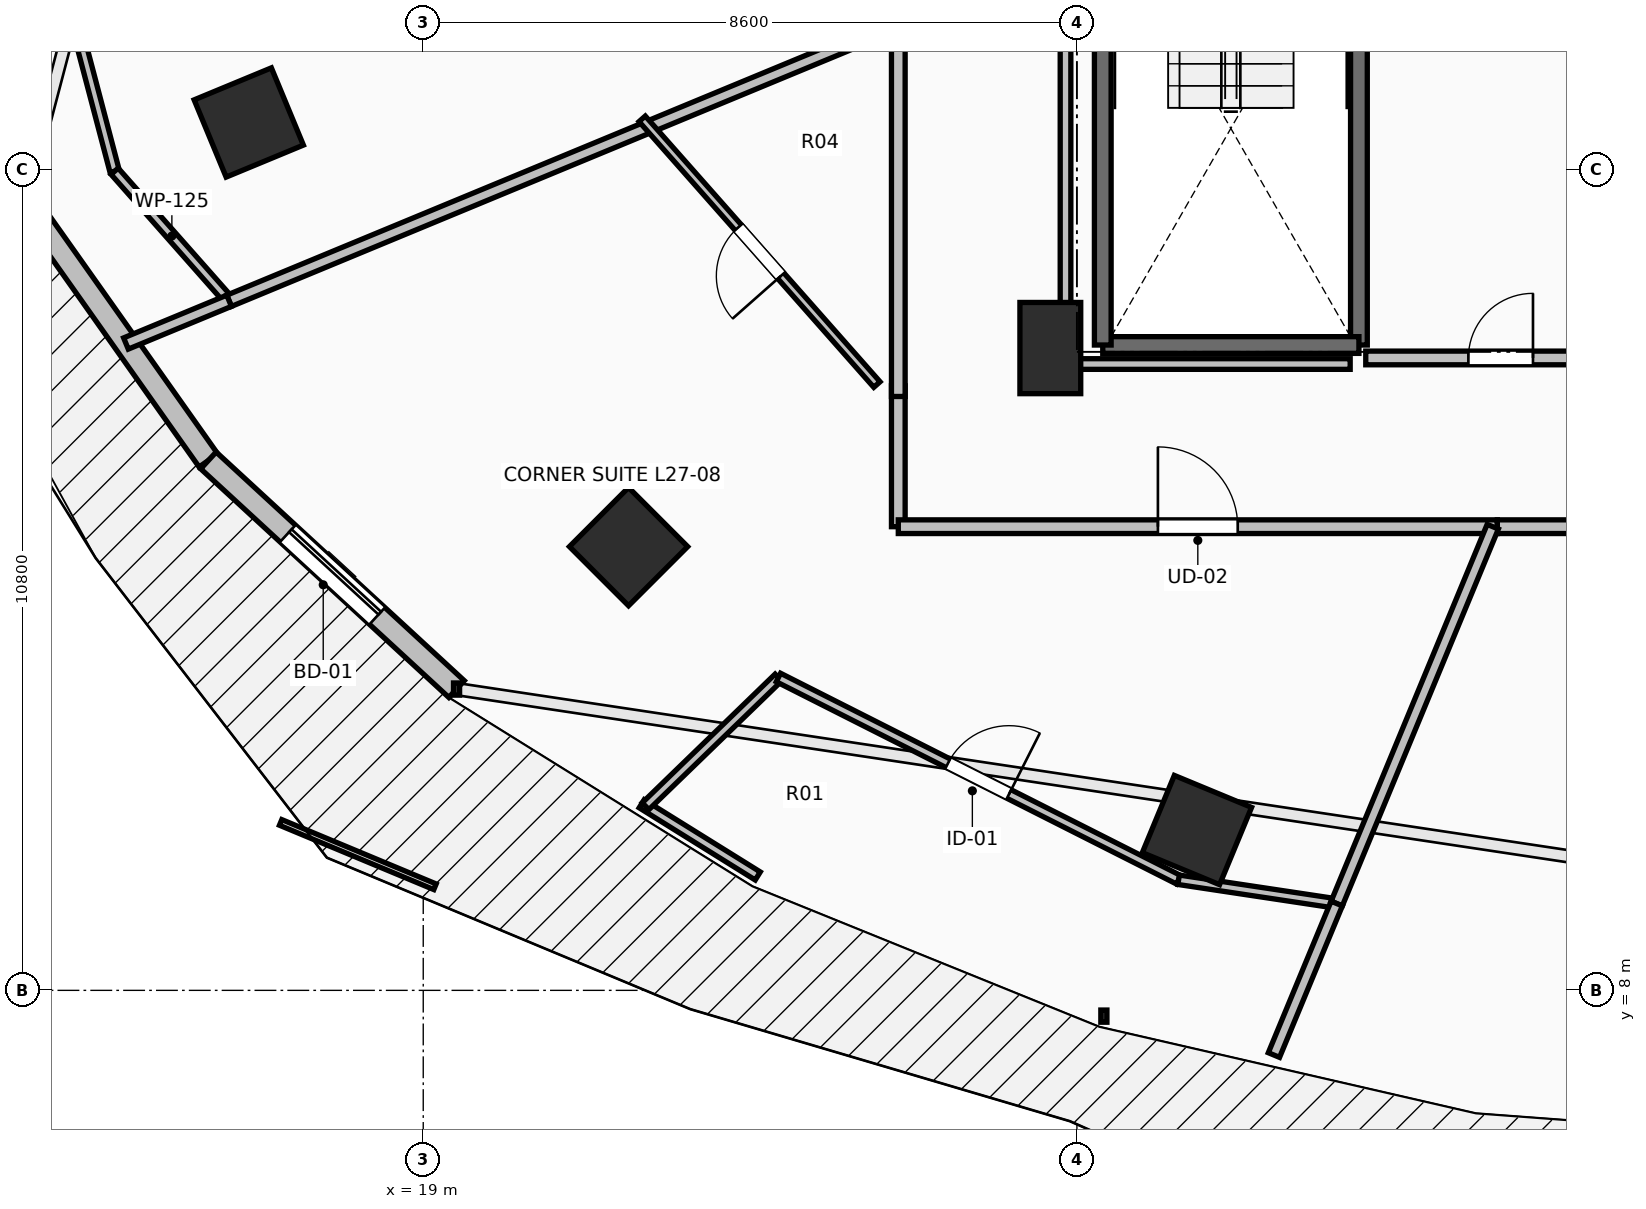
"""IFC4 building model, lengths in metres.
Left out: names, types, materials, properties, quantities, classifications, styles, units other than length and angle.
Written with IfcOpenShell. Run it as: python <this file> out.ifc"""

import sys

from ifc_helpers import new_model, si_unit, direction, frame, frame_2d, origin, origin_2d, place, context, subcontext, project, spatial, rectangle, extrude, element, fill, save


model = new_model("IFC4")
c1 = context("Model", 3, precision=1e-05, world=origin(), true_north=direction((0.0, 1.0)))
c2 = subcontext(c1, "Body", "Model", "MODEL_VIEW")
j1 = project(units=[si_unit("LENGTHUNIT", "METRE"), si_unit("PLANEANGLEUNIT", "RADIAN")], contexts=[c1])
p1 = place(None, origin())
s1 = spatial("IfcSite", under=j1, at=p1, CompositionType="ELEMENT")
p2 = place(p1, origin())
s2 = spatial("IfcBuilding", under=s1, at=p2, CompositionType="ELEMENT")
p3 = place(p2, frame((0.0, 0.0, 103.3)))
s3 = spatial("IfcBuildingStorey", under=s2, at=p3, CompositionType="ELEMENT", Elevation=103.3)
for number, where, z_axis, x_axis in (
    (1, (16.705, 19.418, 0.0), (0.0, 0.0, 1.0), (-0.924, -0.383, 0.0)),
    (2, (21.701, 13.838, 0.0), (0.0, 0.0, 1.0), (-0.707, -0.707, 0.0)),
    (3, (29.179, 10.109, 0.0), (0.0, 0.0, 1.0), (-0.383, -0.924, 0.0)),
):
    element("IfcColumn", number, at=place(p3, frame(where, z_axis=z_axis, x_axis=x_axis)), inside=s3, PredefinedType="COLUMN", context=c2, shape_type="SweptSolid", body=[
        extrude(rectangle(XDim=1.1, YDim=1.1, at=origin_2d()), origin(), (0.0, 0.0, 1.0), 3.5),
    ])
p4 = place(p3, frame((27.25, 16.45, 0.0), z_axis=(0.0, 0.0, 1.0), x_axis=(1.0, 0.0, 0.0)))
e4 = element("IfcColumn", 4, at=p4, inside=s3, PredefinedType="PILASTER", context=c2, shape_type="SweptSolid", body=[
    extrude(rectangle(XDim=0.8, YDim=1.2, at=origin_2d()), origin(), (0.0, 0.0, 1.0), 3.5),
])
p5 = place(p3, frame((13.748, 18.404, 0.0), z_axis=(0.0, 0.0, 1.0), x_axis=(0.57716435238, -0.81662801222, 0.0)))
e5 = element("IfcWall", 5, at=p5, inside=s3, PredefinedType="STANDARD", context=c2, shape_type="SweptSolid", body=[
    extrude(rectangle(XDim=4.202, YDim=0.3, at=frame_2d((2.101, 0.0))), origin(), (0.0, 0.0, 1.0), 3.24),
])
p6 = place(p3, frame((16.174, 14.972, 0.0), z_axis=(0.0, 0.0, 1.0), x_axis=(0.735416718093, -0.677615119924, 0.0)))
e6 = element("IfcWall", 6, at=p6, inside=s3, PredefinedType="STANDARD", context=c2, shape_type="SweptSolid", body=[
    extrude(rectangle(XDim=4.439, YDim=0.3, at=frame_2d((2.22, 0.0))), origin(), (0.0, 0.0, 1.0), 3.24),
])
p7 = place(p6, frame((1.419, 0.0, 0.0)))
e7 = element("IfcOpeningElement", 7, at=p7, cuts=e6, PredefinedType="OPENING", context=c2, shape_type="SweptSolid", body=[
    extrude(rectangle(XDim=1.6, YDim=2.3, at=frame_2d((0.8, 1.15))), frame((0.0, 0.165, 0.0), z_axis=(0.0, -1.0, 0.0), x_axis=(1.0, 0.0, 0.0)), (0.0, 0.0, 1.0), 0.33),
])
p8 = place(p3, frame((31.31, 23.91, 0.0), z_axis=(0.0, 0.0, 1.0), x_axis=(0.0, -1.0, 0.0)))
e8 = element("IfcWall", 8, at=p8, inside=s3, PredefinedType="SOLIDWALL", context=c2, shape_type="SweptSolid", body=[
    extrude(rectangle(XDim=7.42, YDim=0.22, at=frame_2d((3.71, 0.0))), origin(), (0.0, 0.0, 1.0), 3.24),
])
p9 = place(p3, frame((31.31, 16.49, 0.0), z_axis=(0.0, 0.0, 1.0), x_axis=(-1.0, 0.0, 0.0)))
e9 = element("IfcWall", 9, at=p9, inside=s3, PredefinedType="SOLIDWALL", context=c2, shape_type="SweptSolid", body=[
    extrude(rectangle(XDim=3.37, YDim=0.22, at=frame_2d((1.685, 0.0))), origin(), (0.0, 0.0, 1.0), 3.24),
])
p10 = place(p3, frame((27.94, 16.49, 0.0), z_axis=(0.0, 0.0, 1.0), x_axis=(0.0, 1.0, 0.0)))
e10 = element("IfcWall", 10, at=p10, inside=s3, PredefinedType="SOLIDWALL", context=c2, shape_type="SweptSolid", body=[
    extrude(rectangle(XDim=7.42, YDim=0.22, at=frame_2d((3.71, 0.0))), origin(), (0.0, 0.0, 1.0), 3.24),
])
p11 = place(p3, frame((31.4, 16.32, 0.0), z_axis=(0.0, 0.0, 1.0), x_axis=(1.0, 0.0, 0.0)))
e11 = element("IfcWall", 11, at=p11, inside=s3, PredefinedType="PARTITIONING", context=c2, shape_type="SweptSolid", body=[
    extrude(rectangle(XDim=3.55, YDim=0.18, at=frame_2d((1.775, 0.0))), origin(), (0.0, 0.0, 1.0), 3.24),
])
p12 = place(p11, frame((1.35, 0.0, 0.0)))
e12 = element("IfcOpeningElement", 12, at=p12, cuts=e11, PredefinedType="OPENING", context=c2, shape_type="SweptSolid", body=[
    extrude(rectangle(XDim=0.85, YDim=2.1, at=frame_2d((0.425, 1.05))), frame((0.0, 0.105, 0.0), z_axis=(0.0, -1.0, 0.0), x_axis=(1.0, 0.0, 0.0)), (0.0, 0.0, 1.0), 0.21),
])
p13 = place(p3, frame((25.25, 15.953, 0.0), z_axis=(0.0, 0.0, 1.0), x_axis=(0.0, -1.0, 0.0)))
e13 = element("IfcWall", 13, at=p13, inside=s3, PredefinedType="PARTITIONING", context=c2, shape_type="SweptSolid", body=[
    extrude(rectangle(XDim=1.853, YDim=0.18, at=frame_2d((0.926, 0.0))), origin(), (0.0, 0.0, 1.0), 2.432),
])
p14 = place(p3, frame((25.25, 14.1, 0.0), z_axis=(0.0, 0.0, 1.0), x_axis=(1.0, 0.0, 0.0)))
e14 = element("IfcWall", 14, at=p14, inside=s3, PredefinedType="PARTITIONING", context=c2, shape_type="SweptSolid", body=[
    extrude(rectangle(XDim=7.881, YDim=0.18, at=frame_2d((3.94, 0.0))), origin(), (0.0, 0.0, 1.0), 2.432),
])
p15 = place(p14, frame((3.416, 0.0, 0.0)))
e15 = element("IfcOpeningElement", 15, at=p15, cuts=e14, PredefinedType="OPENING", context=c2, shape_type="SweptSolid", body=[
    extrude(rectangle(XDim=1.05, YDim=2.2, at=frame_2d((0.525, 1.1))), frame((0.0, 0.105, 0.0), z_axis=(0.0, -1.0, 0.0), x_axis=(1.0, 0.0, 0.0)), (0.0, 0.0, 1.0), 0.21),
])
p16 = place(p3, frame((25.25, 20.794, 0.0), z_axis=(0.0, 0.0, 1.0), x_axis=(0.0, -1.0, 0.0)))
e16 = element("IfcWall", 16, at=p16, inside=s3, PredefinedType="PARTITIONING", context=c2, shape_type="SweptSolid", body=[
    extrude(rectangle(XDim=4.981, YDim=0.18, at=frame_2d((2.49, 0.0))), origin(), (0.0, 0.0, 1.0), 2.432),
])
p17 = place(p3, frame((33.131, 14.1, 0.0), z_axis=(0.0, 0.0, 1.0), x_axis=(1.0, 0.0, 0.0)))
e17 = element("IfcWall", 17, at=p17, inside=s3, PredefinedType="PARTITIONING", context=c2, shape_type="SweptSolid", body=[
    extrude(rectangle(XDim=9.069, YDim=0.18, at=frame_2d((4.534, 0.0))), origin(), (0.0, 0.0, 1.0), 2.886),
])
p18 = place(p17, frame((4.034, 0.0, 0.0)))
e18 = element("IfcOpeningElement", 18, at=p18, cuts=e17, PredefinedType="OPENING", context=c2, shape_type="SweptSolid", body=[
    extrude(rectangle(XDim=1.0, YDim=2.15, at=frame_2d((0.5, 1.075))), frame((0.0, 0.105, 0.0), z_axis=(0.0, -1.0, 0.0), x_axis=(1.0, 0.0, 0.0)), (0.0, 0.0, 1.0), 0.21),
])
p19 = place(p3, frame((13.04, 26.0, 0.0), z_axis=(0.0, 0.0, 1.0), x_axis=(0.254345287821, -0.967113475536, 0.0)))
e19 = element("IfcWall", 19, at=p19, inside=s3, PredefinedType="PARTITIONING", context=c2, shape_type="SweptSolid", body=[
    extrude(rectangle(XDim=7.47, YDim=0.125, at=frame_2d((3.735, 0.0))), origin(), (0.0, 0.0, 1.0), 3.24),
])
p20 = place(p19, frame((3.285, 0.0, 0.0)))
e20 = element("IfcOpeningElement", 20, at=p20, cuts=e19, PredefinedType="OPENING", context=c2, shape_type="SweptSolid", body=[
    extrude(rectangle(XDim=0.9, YDim=2.1, at=frame_2d((0.45, 1.05))), frame((0.0, 0.077, 0.0), z_axis=(0.0, -1.0, 0.0), x_axis=(1.0, 0.0, 0.0)), (0.0, 0.0, 1.0), 0.155),
])
p21 = place(p3, frame((14.94, 18.776, 0.0), z_axis=(0.0, 0.0, 1.0), x_axis=(0.662288913482, -0.749248553605, 0.0)))
e21 = element("IfcWall", 21, at=p21, inside=s3, PredefinedType="PARTITIONING", context=c2, shape_type="SweptSolid", body=[
    extrude(rectangle(XDim=2.274, YDim=0.125, at=frame_2d((1.137, 0.0))), origin(), (0.0, 0.0, 1.0), 3.24),
])
p22 = place(p3, frame((16.446, 17.072, 0.0), z_axis=(0.0, 0.0, 1.0), x_axis=(0.92387006918, 0.382706278068, 0.0)))
e22 = element("IfcWall", 22, at=p22, inside=s3, PredefinedType="PARTITIONING", context=c2, shape_type="SweptSolid", body=[
    extrude(rectangle(XDim=9.53, YDim=0.16, at=frame_2d((4.765, 0.0))), origin(), (0.0, 0.0, 1.0), 2.432),
])
p23 = place(p3, frame((15.089, 16.51, 0.0), z_axis=(0.0, 0.0, 1.0), x_axis=(0.923891226159, 0.382655200183, 0.0)))
e23 = element("IfcWall", 23, at=p23, inside=s3, PredefinedType="PARTITIONING", context=c2, shape_type="SweptSolid", body=[
    extrude(rectangle(XDim=1.469, YDim=0.16, at=frame_2d((0.734, 0.0))), origin(), (0.0, 0.0, 1.0), 3.24),
])
p24 = place(p3, frame((24.969, 15.97, 0.0), z_axis=(0.0, 0.0, 1.0), x_axis=(-0.662106207726, 0.749410014405, 0.0)))
e24 = element("IfcWall", 24, at=p24, inside=s3, PredefinedType="PARTITIONING", context=c2, shape_type="SweptSolid", body=[
    extrude(rectangle(XDim=4.665, YDim=0.11, at=frame_2d((2.332, 0.0))), origin(), (0.0, 0.0, 1.0), 2.432),
])
p25 = place(p24, frame((1.907, 0.0, 0.0)))
e25 = element("IfcOpeningElement", 25, at=p25, cuts=e24, PredefinedType="OPENING", context=c2, shape_type="SweptSolid", body=[
    extrude(rectangle(XDim=0.85, YDim=2.1, at=frame_2d((0.425, 1.05))), frame((0.0, 0.07, 0.0), z_axis=(0.0, -1.0, 0.0), x_axis=(1.0, 0.0, 0.0)), (0.0, 0.0, 1.0), 0.14),
])
p26 = place(p3, frame((21.874, 10.455, 0.0), z_axis=(0.0, 0.0, 1.0), x_axis=(0.849018711668, -0.528362779951, 0.0)))
e26 = element("IfcWall", 26, at=p26, inside=s3, PredefinedType="PARTITIONING", context=c2, shape_type="SweptSolid", body=[
    extrude(rectangle(XDim=1.798, YDim=0.125, at=frame_2d((0.899, 0.0))), origin(), (0.0, 0.0, 1.0), 3.24),
])
p27 = place(p3, frame((21.925, 10.423, 0.0), z_axis=(0.0, 0.0, 1.0), x_axis=(0.718353026202, 0.695678754704, 0.0)))
e27 = element("IfcWall", 27, at=p27, inside=s3, PredefinedType="PARTITIONING", context=c2, shape_type="SweptSolid", body=[
    extrude(rectangle(XDim=2.433, YDim=0.125, at=frame_2d((1.217, 0.0))), origin(), (0.0, 0.0, 1.0), 3.24),
])
p28 = place(p3, frame((23.673, 12.116, 0.0), z_axis=(0.0, 0.0, 1.0), x_axis=(0.892490283816, -0.451066617357, 0.0)))
e28 = element("IfcWall", 28, at=p28, inside=s3, PredefinedType="PARTITIONING", context=c2, shape_type="SweptSolid", body=[
    extrude(rectangle(XDim=5.899, YDim=0.125, at=frame_2d((2.95, 0.0))), origin(), (0.0, 0.0, 1.0), 3.24),
])
p29 = place(p28, frame((2.5, 0.0, 0.0)))
e29 = element("IfcOpeningElement", 29, at=p29, cuts=e28, PredefinedType="OPENING", context=c2, shape_type="SweptSolid", body=[
    extrude(rectangle(XDim=0.9, YDim=2.1, at=frame_2d((0.45, 1.05))), frame((0.0, 0.077, 0.0), z_axis=(0.0, -1.0, 0.0), x_axis=(1.0, 0.0, 0.0)), (0.0, 0.0, 1.0), 0.155),
])
p30 = place(p3, frame((28.938, 9.455, 0.0), z_axis=(0.0, 0.0, 1.0), x_axis=(0.988868142427, -0.148794478708, 0.0)))
e30 = element("IfcWall", 30, at=p30, inside=s3, PredefinedType="PARTITIONING", context=c2, shape_type="SweptSolid", body=[
    extrude(rectangle(XDim=2.104, YDim=0.125, at=frame_2d((1.052, 0.0))), origin(), (0.0, 0.0, 1.0), 3.24),
])
p31 = place(p3, frame((31.018, 9.142, 0.0), z_axis=(0.0, 0.0, 1.0), x_axis=(0.382572793579, 0.923925352836, 0.0)))
e31 = element("IfcWall", 31, at=p31, inside=s3, PredefinedType="PARTITIONING", context=c2, shape_type="SweptSolid", body=[
    extrude(rectangle(XDim=5.366, YDim=0.16, at=frame_2d((2.683, 0.0))), origin(), (0.0, 0.0, 1.0), 2.677),
])
p32 = place(p3, frame((30.192, 7.149, 0.0), z_axis=(0.0, 0.0, 1.0), x_axis=(0.382911401564, 0.923785071622, 0.0)))
e32 = element("IfcWall", 32, at=p32, inside=s3, PredefinedType="PARTITIONING", context=c2, shape_type="SweptSolid", body=[
    extrude(rectangle(XDim=2.158, YDim=0.16, at=frame_2d((1.079, 0.0))), origin(), (0.0, 0.0, 1.0), 3.24),
])
p33 = place(p3, frame((31.195, 16.24, 0.0), z_axis=(0.0, 0.0, 1.0), x_axis=(-1.0, 0.0, 0.0)))
e33 = element("IfcWall", 33, at=p33, inside=s3, PredefinedType="PARTITIONING", context=c2, shape_type="SweptSolid", body=[
    extrude(rectangle(XDim=3.745, YDim=0.14, at=frame_2d((1.873, 0.0))), origin(), (0.0, 0.0, 1.0), 2.432),
])
p34 = place(p3, frame((27.45, 16.24, 0.0), z_axis=(0.0, 0.0, 1.0), x_axis=(0.0, 1.0, 0.0)))
e34 = element("IfcWall", 34, at=p34, inside=s3, PredefinedType="PARTITIONING", context=c2, shape_type="SweptSolid", body=[
    extrude(rectangle(XDim=7.514, YDim=0.14, at=frame_2d((3.757, 0.0))), origin(), (0.0, 0.0, 1.0), 2.432),
])
p35 = place(p7, origin())
e35 = element("IfcDoor", 35, at=p35, inside=s3, OperationType="SLIDING_TO_LEFT", PredefinedType="DOOR", context=c2, shape_type="SweptSolid", body=[
    extrude(rectangle(XDim=1.6, YDim=2.3, at=frame_2d((0.8, 1.15))), frame((0.0, 0.025, 0.0), z_axis=(0.0, -1.0, 0.0), x_axis=(1.0, 0.0, 0.0)), (0.0, 0.0, 1.0), 0.05),
])
fill(e7, e35)
p36 = place(p12, origin())
e36 = element("IfcDoor", 36, at=p36, inside=s3, OperationType="SINGLE_SWING_RIGHT", PredefinedType="DOOR", context=c2, shape_type="SweptSolid", body=[
    extrude(rectangle(XDim=0.85, YDim=2.1, at=frame_2d((0.425, 1.05))), frame((0.0, 0.025, 0.0), z_axis=(0.0, -1.0, 0.0), x_axis=(1.0, 0.0, 0.0)), (0.0, 0.0, 1.0), 0.05),
])
fill(e12, e36)
p37 = place(p15, origin())
e37 = element("IfcDoor", 37, at=p37, inside=s3, OperationType="SINGLE_SWING_LEFT", PredefinedType="DOOR", context=c2, shape_type="SweptSolid", body=[
    extrude(rectangle(XDim=1.05, YDim=2.2, at=frame_2d((0.525, 1.1))), frame((0.0, 0.025, 0.0), z_axis=(0.0, -1.0, 0.0), x_axis=(1.0, 0.0, 0.0)), (0.0, 0.0, 1.0), 0.05),
])
fill(e15, e37)
p38 = place(p25, origin())
e38 = element("IfcDoor", 38, at=p38, inside=s3, OperationType="SINGLE_SWING_LEFT", PredefinedType="DOOR", context=c2, shape_type="SweptSolid", body=[
    extrude(rectangle(XDim=0.85, YDim=2.1, at=frame_2d((0.425, 1.05))), frame((0.0, 0.025, 0.0), z_axis=(0.0, -1.0, 0.0), x_axis=(1.0, 0.0, 0.0)), (0.0, 0.0, 1.0), 0.05),
])
fill(e25, e38)
p39 = place(p29, origin())
e39 = element("IfcDoor", 39, at=p39, inside=s3, OperationType="SINGLE_SWING_RIGHT", PredefinedType="DOOR", context=c2, shape_type="SweptSolid", body=[
    extrude(rectangle(XDim=0.9, YDim=2.1, at=frame_2d((0.45, 1.05))), frame((0.0, 0.025, 0.0), z_axis=(0.0, -1.0, 0.0), x_axis=(1.0, 0.0, 0.0)), (0.0, 0.0, 1.0), 0.05),
])
fill(e29, e39)
save(model, sys.argv[1])
